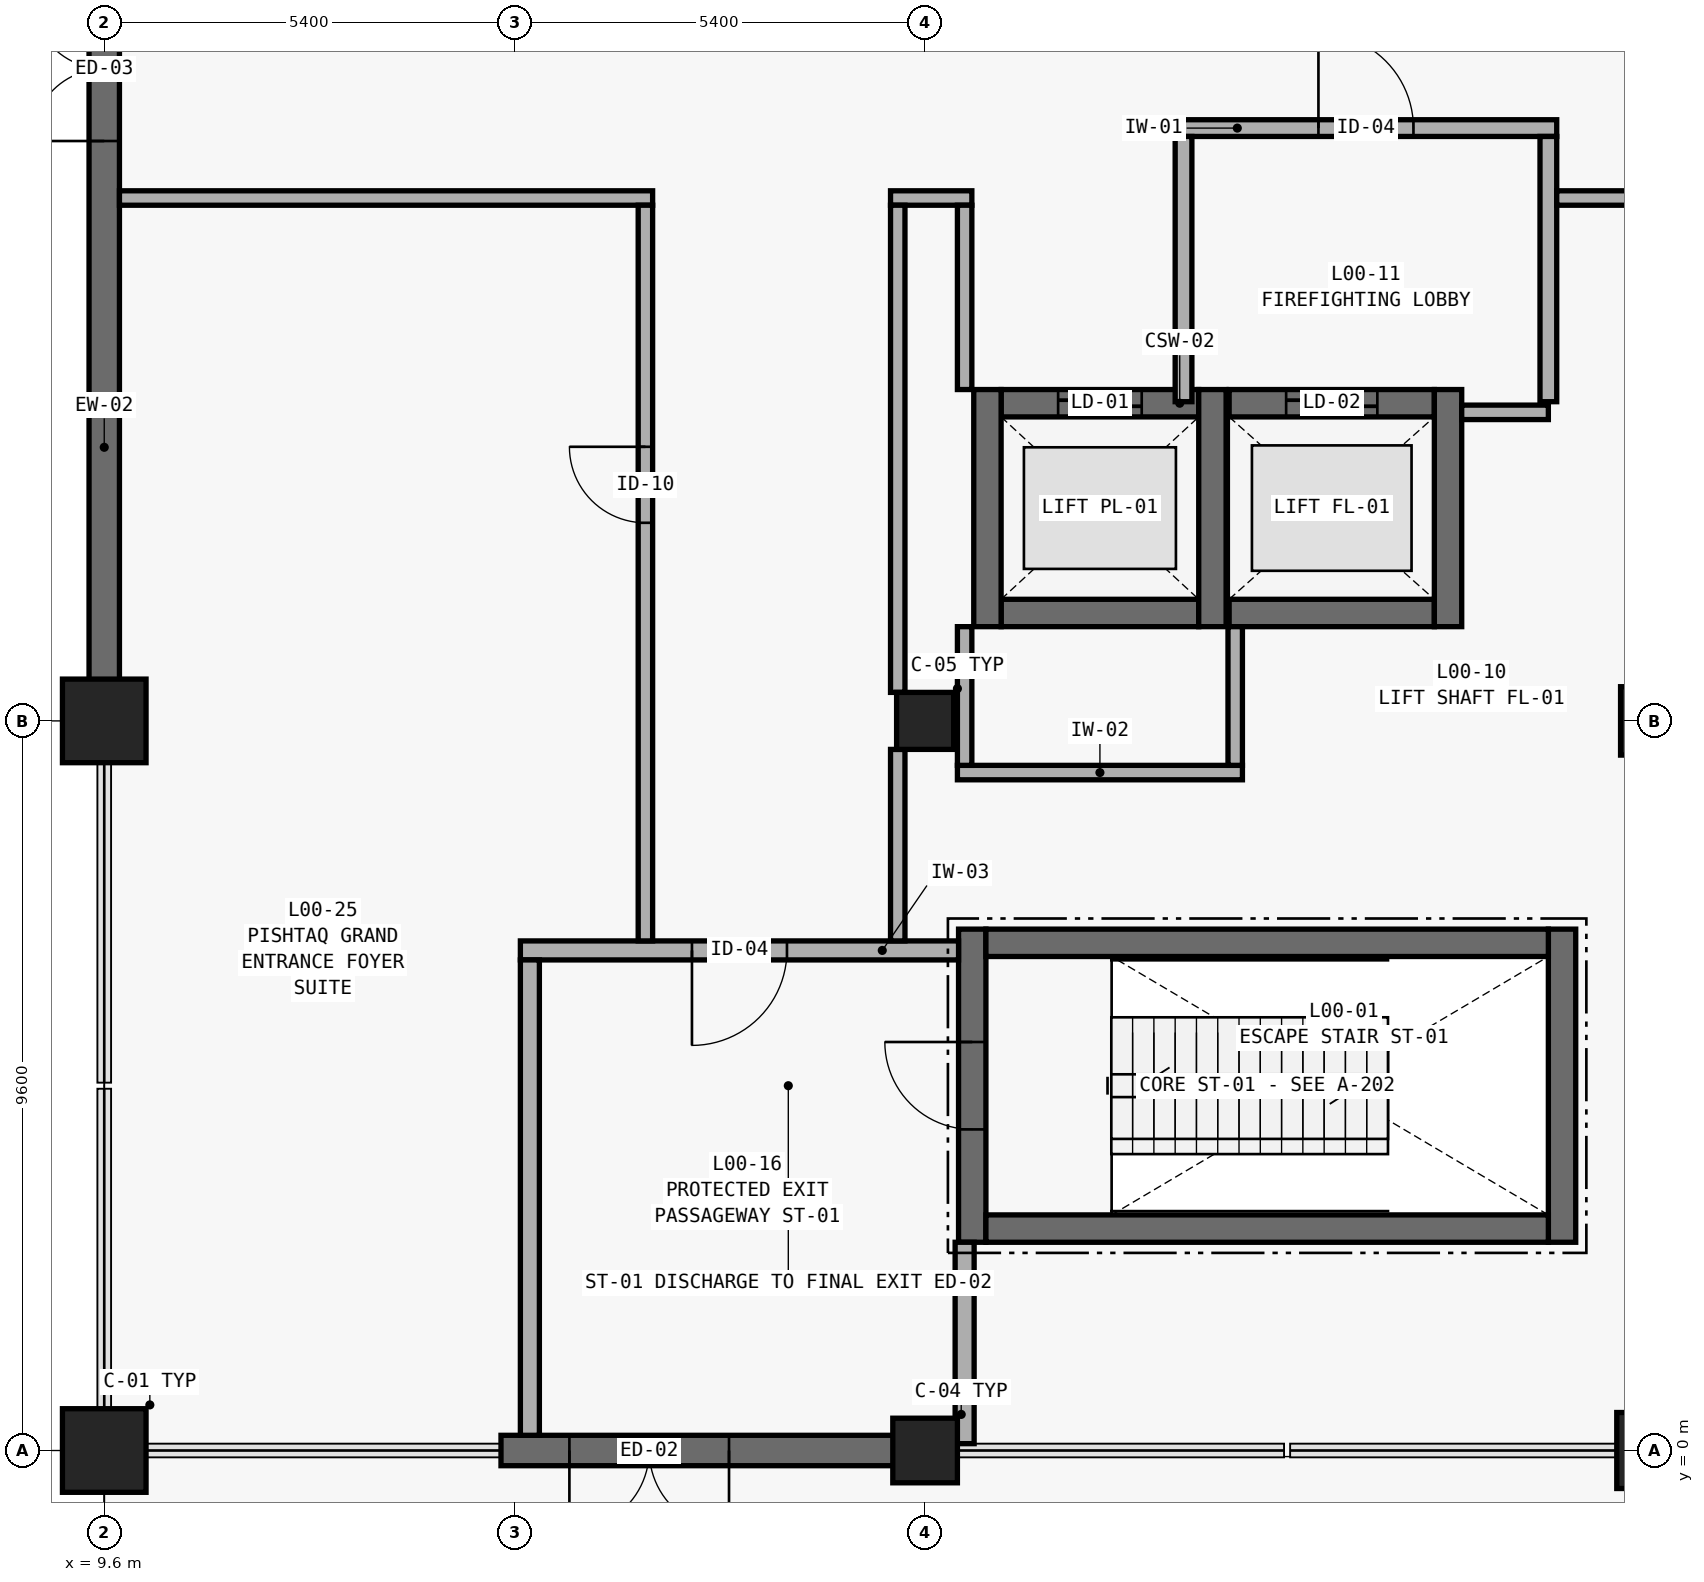
"""IFC4 building model, lengths in metres.
Left out: names, types, materials, properties, quantities, classifications, styles, units other than length and angle.
Written with IfcOpenShell. Run it as: python <this file> out.ifc"""

import sys

from ifc_helpers import new_model, si_unit, direction, frame, frame_2d, origin, origin_2d, place, context, subcontext, project, spatial, rectangle, extrude, element, fill, save


model = new_model("IFC4")
c1 = context("Model", 3, precision=1e-05, world=origin(), true_north=direction((0.0, 1.0)))
c2 = subcontext(c1, "Body", "Model", "MODEL_VIEW")
j1 = project(units=[si_unit("LENGTHUNIT", "METRE"), si_unit("PLANEANGLEUNIT", "RADIAN")], contexts=[c1])
p1 = place(None, origin())
s1 = spatial("IfcSite", under=j1, at=p1, CompositionType="ELEMENT")
p2 = place(p1, origin())
s2 = spatial("IfcBuilding", under=s1, at=p2, CompositionType="ELEMENT")
p3 = place(p2, origin())
s3 = spatial("IfcBuildingStorey", under=s2, at=p3, CompositionType="ELEMENT", Elevation=0.0)
for number, where, z_axis, x_axis in (
    (1, (9.6, 0.0, 0.0), (0.0, 0.0, 1.0), (1.0, 0.0, 0.0)),
    (2, (9.6, 9.6, 0.0), (0.0, 0.0, 1.0), (1.0, 0.0, 0.0)),
):
    element("IfcColumn", number, at=place(p3, frame(where, z_axis=z_axis, x_axis=x_axis)), inside=s3, PredefinedType="COLUMN", context=c2, shape_type="SweptSolid", body=[
        extrude(rectangle(XDim=1.1, YDim=1.1, at=origin_2d()), origin(), (0.0, 0.0, 1.0), 4.8),
    ])
p4 = place(p3, frame((20.4, 0.0, 0.0), z_axis=(0.0, 0.0, 1.0), x_axis=(1.0, 0.0, 0.0)))
e3 = element("IfcColumn", 3, at=p4, inside=s3, PredefinedType="COLUMN", context=c2, shape_type="SweptSolid", body=[
    extrude(rectangle(XDim=0.85, YDim=0.85, at=origin_2d()), origin(), (0.0, 0.0, 1.0), 4.8),
])
p5 = place(p3, frame((20.4, 9.6, 0.0), z_axis=(0.0, 0.0, 1.0), x_axis=(1.0, 0.0, 0.0)))
e4 = element("IfcColumn", 4, at=p5, inside=s3, PredefinedType="COLUMN", context=c2, shape_type="SweptSolid", body=[
    extrude(rectangle(XDim=0.75, YDim=0.75, at=origin_2d()), origin(), (0.0, 0.0, 1.0), 4.8),
])
p6 = place(p3, frame((30.0, 0.0, 0.0), z_axis=(0.0, 0.0, 1.0), x_axis=(1.0, 0.0, 0.0)))
e5 = element("IfcColumn", 5, at=p6, inside=s3, PredefinedType="COLUMN", context=c2, shape_type="SweptSolid", body=[
    extrude(rectangle(XDim=1.0, YDim=1.0, at=origin_2d()), origin(), (0.0, 0.0, 1.0), 4.8),
])
p7 = place(p3, frame((30.0, 9.6, 0.0), z_axis=(0.0, 0.0, 1.0), x_axis=(1.0, 0.0, 0.0)))
e6 = element("IfcColumn", 6, at=p7, inside=s3, PredefinedType="COLUMN", context=c2, shape_type="SweptSolid", body=[
    extrude(rectangle(XDim=0.9, YDim=0.9, at=origin_2d()), origin(), (0.0, 0.0, 1.0), 4.8),
])
p8 = place(p3, frame((9.6, 21.78, 0.0), z_axis=(0.0, 0.0, 1.0), x_axis=(0.0, -1.0, 0.0)))
e7 = element("IfcWall", 7, at=p8, inside=s3, PredefinedType="STANDARD", context=c2, shape_type="SweptSolid", body=[
    extrude(rectangle(XDim=12.36, YDim=0.4, at=frame_2d((6.18, 0.0))), origin(), (0.0, 0.0, 1.0), 4.5),
])
p9 = place(p8, frame((2.65, 0.0, 0.0)))
e8 = element("IfcOpeningElement", 8, at=p9, cuts=e7, PredefinedType="OPENING", context=c2, shape_type="SweptSolid", body=[
    extrude(rectangle(XDim=1.9, YDim=2.4, at=frame_2d((0.95, 1.2))), frame((0.0, 0.215, 0.0), z_axis=(0.0, -1.0, 0.0), x_axis=(1.0, 0.0, 0.0)), (0.0, 0.0, 1.0), 0.43),
])
p10 = place(p3, frame((14.82, 0.0, 0.0), z_axis=(0.0, 0.0, 1.0), x_axis=(1.0, 0.0, 0.0)))
e9 = element("IfcWall", 9, at=p10, inside=s3, PredefinedType="STANDARD", context=c2, shape_type="SweptSolid", body=[
    extrude(rectangle(XDim=5.76, YDim=0.4, at=frame_2d((2.88, 0.0))), origin(), (0.0, 0.0, 1.0), 4.5),
])
p11 = place(p10, frame((0.9, 0.0, 0.0)))
e10 = element("IfcOpeningElement", 10, at=p11, cuts=e9, PredefinedType="OPENING", context=c2, shape_type="SweptSolid", body=[
    extrude(rectangle(XDim=2.1, YDim=2.6, at=frame_2d((1.05, 1.3))), frame((0.0, 0.215, 0.0), z_axis=(0.0, -1.0, 0.0), x_axis=(1.0, 0.0, 0.0)), (0.0, 0.0, 1.0), 0.43),
])
p12 = place(p3, frame((21.02, 2.74, 0.0), z_axis=(0.0, 0.0, 1.0), x_axis=(0.0, 1.0, 0.0)))
e11 = element("IfcWall", 11, at=p12, inside=s3, PredefinedType="SHEAR", context=c2, shape_type="SweptSolid", body=[
    extrude(rectangle(XDim=4.12, YDim=0.36, at=frame_2d((2.06, 0.0))), origin(), (0.0, 0.0, 1.0), 4.5),
])
p13 = place(p12, frame((1.485, 0.0, 0.0)))
e12 = element("IfcOpeningElement", 12, at=p13, cuts=e11, PredefinedType="OPENING", context=c2, shape_type="SweptSolid", body=[
    extrude(rectangle(XDim=1.15, YDim=2.15, at=frame_2d((0.575, 1.075))), frame((0.0, 0.195, 0.0), z_axis=(0.0, -1.0, 0.0), x_axis=(1.0, 0.0, 0.0)), (0.0, 0.0, 1.0), 0.39),
])
p14 = place(p3, frame((28.78, 2.74, 0.0), z_axis=(0.0, 0.0, 1.0), x_axis=(0.0, 1.0, 0.0)))
e13 = element("IfcWall", 13, at=p14, inside=s3, PredefinedType="SHEAR", context=c2, shape_type="SweptSolid", body=[
    extrude(rectangle(XDim=4.12, YDim=0.36, at=frame_2d((2.06, 0.0))), origin(), (0.0, 0.0, 1.0), 4.5),
])
for number, where, z_axis, x_axis in (
    (14, (21.2, 6.68, 0.0), (0.0, 0.0, 1.0), (1.0, 0.0, 0.0)),
    (15, (21.2, 2.92, 0.0), (0.0, 0.0, 1.0), (1.0, 0.0, 0.0)),
):
    element("IfcWall", number, at=place(p3, frame(where, z_axis=z_axis, x_axis=x_axis)), inside=s3, PredefinedType="SHEAR", context=c2, shape_type="SweptSolid", body=[
        extrude(rectangle(XDim=7.4, YDim=0.36, at=frame_2d((3.7, 0.0))), origin(), (0.0, 0.0, 1.0), 4.5),
    ])
p15 = place(p3, frame((21.4, 13.78, 0.0), z_axis=(0.0, 0.0, 1.0), x_axis=(1.0, 0.0, 0.0)))
e16 = element("IfcWall", 16, at=p15, inside=s3, PredefinedType="SHEAR", context=c2, shape_type="SweptSolid", body=[
    extrude(rectangle(XDim=2.6, YDim=0.36, at=frame_2d((1.3, 0.0))), origin(), (0.0, 0.0, 1.0), 4.5),
])
p16 = place(p15, frame((0.75, 0.0, 0.0)))
e17 = element("IfcOpeningElement", 17, at=p16, cuts=e16, PredefinedType="OPENING", context=c2, shape_type="SweptSolid", body=[
    extrude(rectangle(XDim=1.1, YDim=2.15, at=frame_2d((0.55, 1.075))), frame((0.0, 0.195, 0.0), z_axis=(0.0, -1.0, 0.0), x_axis=(1.0, 0.0, 0.0)), (0.0, 0.0, 1.0), 0.39),
])
p17 = place(p3, frame((21.4, 11.02, 0.0), z_axis=(0.0, 0.0, 1.0), x_axis=(1.0, 0.0, 0.0)))
e18 = element("IfcWall", 18, at=p17, inside=s3, PredefinedType="SHEAR", context=c2, shape_type="SweptSolid", body=[
    extrude(rectangle(XDim=2.6, YDim=0.36, at=frame_2d((1.3, 0.0))), origin(), (0.0, 0.0, 1.0), 4.5),
])
for number, where, z_axis, x_axis in (
    (19, (21.22, 10.84, 0.0), (0.0, 0.0, 1.0), (0.0, 1.0, 0.0)),
    (20, (24.18, 10.84, 0.0), (0.0, 0.0, 1.0), (0.0, 1.0, 0.0)),
):
    element("IfcWall", number, at=place(p3, frame(where, z_axis=z_axis, x_axis=x_axis)), inside=s3, PredefinedType="SHEAR", context=c2, shape_type="SweptSolid", body=[
        extrude(rectangle(XDim=3.12, YDim=0.36, at=frame_2d((1.56, 0.0))), origin(), (0.0, 0.0, 1.0), 4.5),
    ])
p18 = place(p3, frame((24.4, 13.78, 0.0), z_axis=(0.0, 0.0, 1.0), x_axis=(1.0, 0.0, 0.0)))
e21 = element("IfcWall", 21, at=p18, inside=s3, PredefinedType="SHEAR", context=c2, shape_type="SweptSolid", body=[
    extrude(rectangle(XDim=2.7, YDim=0.36, at=frame_2d((1.35, 0.0))), origin(), (0.0, 0.0, 1.0), 4.5),
])
p19 = place(p18, frame((0.75, 0.0, 0.0)))
e22 = element("IfcOpeningElement", 22, at=p19, cuts=e21, PredefinedType="OPENING", context=c2, shape_type="SweptSolid", body=[
    extrude(rectangle(XDim=1.2, YDim=2.15, at=frame_2d((0.6, 1.075))), frame((0.0, 0.195, 0.0), z_axis=(0.0, -1.0, 0.0), x_axis=(1.0, 0.0, 0.0)), (0.0, 0.0, 1.0), 0.39),
])
p20 = place(p3, frame((24.4, 11.02, 0.0), z_axis=(0.0, 0.0, 1.0), x_axis=(1.0, 0.0, 0.0)))
e23 = element("IfcWall", 23, at=p20, inside=s3, PredefinedType="SHEAR", context=c2, shape_type="SweptSolid", body=[
    extrude(rectangle(XDim=2.7, YDim=0.36, at=frame_2d((1.35, 0.0))), origin(), (0.0, 0.0, 1.0), 4.5),
])
p21 = place(p3, frame((27.28, 10.84, 0.0), z_axis=(0.0, 0.0, 1.0), x_axis=(0.0, 1.0, 0.0)))
e24 = element("IfcWall", 24, at=p21, inside=s3, PredefinedType="SHEAR", context=c2, shape_type="SweptSolid", body=[
    extrude(rectangle(XDim=3.12, YDim=0.36, at=frame_2d((1.56, 0.0))), origin(), (0.0, 0.0, 1.0), 4.5),
])
p22 = place(p3, frame((23.69, 17.4, 0.0), z_axis=(0.0, 0.0, 1.0), x_axis=(1.0, 0.0, 0.0)))
e25 = element("IfcWall", 25, at=p22, inside=s3, PredefinedType="PARTITIONING", context=c2, shape_type="SweptSolid", body=[
    extrude(rectangle(XDim=5.02, YDim=0.22, at=frame_2d((2.51, 0.0))), origin(), (0.0, 0.0, 1.0), 3.38),
])
p23 = place(p22, frame((1.885, 0.0, 0.0)))
e26 = element("IfcOpeningElement", 26, at=p23, cuts=e25, PredefinedType="OPENING", context=c2, shape_type="SweptSolid", body=[
    extrude(rectangle(XDim=1.25, YDim=2.15, at=frame_2d((0.625, 1.075))), frame((0.0, 0.125, 0.0), z_axis=(0.0, -1.0, 0.0), x_axis=(1.0, 0.0, 0.0)), (0.0, 0.0, 1.0), 0.25),
])
for number, where, z_axis, x_axis in (
    (27, (23.8, 13.8, 0.0), (0.0, 0.0, 1.0), (0.0, 1.0, 0.0)),
    (28, (28.6, 13.8, 0.0), (0.0, 0.0, 1.0), (0.0, 1.0, 0.0)),
):
    element("IfcWall", number, at=place(p3, frame(where, z_axis=z_axis, x_axis=x_axis)), inside=s3, PredefinedType="PARTITIONING", context=c2, shape_type="SweptSolid", body=[
        extrude(rectangle(XDim=3.49, YDim=0.22, at=frame_2d((1.745, 0.0))), origin(), (0.0, 0.0, 1.0), 3.38),
    ])
p24 = place(p3, frame((15.075, 6.58, 0.0), z_axis=(0.0, 0.0, 1.0), x_axis=(1.0, 0.0, 0.0)))
e29 = element("IfcWall", 29, at=p24, inside=s3, PredefinedType="PARTITIONING", context=c2, shape_type="SweptSolid", body=[
    extrude(rectangle(XDim=5.765, YDim=0.25, at=frame_2d((2.883, 0.0))), origin(), (0.0, 0.0, 1.0), 3.38),
])
p25 = place(p24, frame((2.258, 0.0, 0.0)))
e30 = element("IfcOpeningElement", 30, at=p25, cuts=e29, PredefinedType="OPENING", context=c2, shape_type="SweptSolid", body=[
    extrude(rectangle(XDim=1.25, YDim=2.15, at=frame_2d((0.625, 1.075))), frame((0.0, 0.14, 0.0), z_axis=(0.0, -1.0, 0.0), x_axis=(1.0, 0.0, 0.0)), (0.0, 0.0, 1.0), 0.28),
])
p26 = place(p3, frame((20.825, 8.92, 0.0), z_axis=(0.0, 0.0, 1.0), x_axis=(1.0, 0.0, 0.0)))
e31 = element("IfcWall", 31, at=p26, inside=s3, PredefinedType="PARTITIONING", context=c2, shape_type="SweptSolid", body=[
    extrude(rectangle(XDim=3.75, YDim=0.19, at=frame_2d((1.875, 0.0))), origin(), (0.0, 0.0, 1.0), 3.38),
])
p27 = place(p3, frame((27.46, 13.66, 0.0), z_axis=(0.0, 0.0, 1.0), x_axis=(1.0, 0.0, 0.0)))
e32 = element("IfcWall", 32, at=p27, inside=s3, PredefinedType="PARTITIONING", context=c2, shape_type="SweptSolid", body=[
    extrude(rectangle(XDim=1.14, YDim=0.19, at=frame_2d((0.57, 0.0))), origin(), (0.0, 0.0, 1.0), 3.38),
])
p28 = place(p3, frame((9.8, 16.48, 0.0), z_axis=(0.0, 0.0, 1.0), x_axis=(1.0, 0.0, 0.0)))
e33 = element("IfcWall", 33, at=p28, inside=s3, PredefinedType="PARTITIONING", context=c2, shape_type="SweptSolid", body=[
    extrude(rectangle(XDim=7.015, YDim=0.19, at=frame_2d((3.507, 0.0))), origin(), (0.0, 0.0, 1.0), 3.38),
])
p29 = place(p3, frame((19.945, 16.48, 0.0), z_axis=(0.0, 0.0, 1.0), x_axis=(1.0, 0.0, 0.0)))
e34 = element("IfcWall", 34, at=p29, inside=s3, PredefinedType="PARTITIONING", context=c2, shape_type="SweptSolid", body=[
    extrude(rectangle(XDim=1.07, YDim=0.19, at=frame_2d((0.535, 0.0))), origin(), (0.0, 0.0, 1.0), 3.38),
])
p30 = place(p3, frame((28.71, 16.48, 0.0), z_axis=(0.0, 0.0, 1.0), x_axis=(1.0, 0.0, 0.0)))
e35 = element("IfcWall", 35, at=p30, inside=s3, PredefinedType="PARTITIONING", context=c2, shape_type="SweptSolid", body=[
    extrude(rectangle(XDim=2.305, YDim=0.19, at=frame_2d((1.152, 0.0))), origin(), (0.0, 0.0, 1.0), 3.38),
])
p31 = place(p3, frame((15.2, 0.2, 0.0), z_axis=(0.0, 0.0, 1.0), x_axis=(0.0, 1.0, 0.0)))
e36 = element("IfcWall", 36, at=p31, inside=s3, PredefinedType="PARTITIONING", context=c2, shape_type="SweptSolid", body=[
    extrude(rectangle(XDim=6.255, YDim=0.25, at=frame_2d((3.127, 0.0))), origin(), (0.0, 0.0, 1.0), 3.38),
])
p32 = place(p3, frame((16.72, 6.705, 0.0), z_axis=(0.0, 0.0, 1.0), x_axis=(0.0, 1.0, 0.0)))
e37 = element("IfcWall", 37, at=p32, inside=s3, PredefinedType="PARTITIONING", context=c2, shape_type="SweptSolid", body=[
    extrude(rectangle(XDim=9.68, YDim=0.19, at=frame_2d((4.84, 0.0))), origin(), (0.0, 0.0, 1.0), 3.38),
])
p33 = place(p32, frame((5.502, 0.0, 0.0)))
e38 = element("IfcOpeningElement", 38, at=p33, cuts=e37, PredefinedType="OPENING", context=c2, shape_type="SweptSolid", body=[
    extrude(rectangle(XDim=1.0, YDim=2.15, at=frame_2d((0.5, 1.075))), frame((0.0, 0.11, 0.0), z_axis=(0.0, -1.0, 0.0), x_axis=(1.0, 0.0, 0.0)), (0.0, 0.0, 1.0), 0.22),
])
p34 = place(p3, frame((20.04, 6.705, 0.0), z_axis=(0.0, 0.0, 1.0), x_axis=(0.0, 1.0, 0.0)))
e39 = element("IfcWall", 39, at=p34, inside=s3, PredefinedType="PARTITIONING", context=c2, shape_type="SweptSolid", body=[
    extrude(rectangle(XDim=2.52, YDim=0.19, at=frame_2d((1.26, 0.0))), origin(), (0.0, 0.0, 1.0), 3.38),
])
p35 = place(p3, frame((20.04, 9.975, 0.0), z_axis=(0.0, 0.0, 1.0), x_axis=(0.0, 1.0, 0.0)))
e40 = element("IfcWall", 40, at=p35, inside=s3, PredefinedType="PARTITIONING", context=c2, shape_type="SweptSolid", body=[
    extrude(rectangle(XDim=6.41, YDim=0.19, at=frame_2d((3.205, 0.0))), origin(), (0.0, 0.0, 1.0), 3.38),
])
p36 = place(p3, frame((20.92, 0.09, 0.0), z_axis=(0.0, 0.0, 1.0), x_axis=(0.0, 1.0, 0.0)))
e41 = element("IfcWall", 41, at=p36, inside=s3, PredefinedType="PARTITIONING", context=c2, shape_type="SweptSolid", body=[
    extrude(rectangle(XDim=2.65, YDim=0.25, at=frame_2d((1.325, 0.0))), origin(), (0.0, 0.0, 1.0), 3.38),
])
p37 = place(p3, frame((20.92, 9.015, 0.0), z_axis=(0.0, 0.0, 1.0), x_axis=(0.0, 1.0, 0.0)))
e42 = element("IfcWall", 42, at=p37, inside=s3, PredefinedType="PARTITIONING", context=c2, shape_type="SweptSolid", body=[
    extrude(rectangle(XDim=1.825, YDim=0.19, at=frame_2d((0.913, 0.0))), origin(), (0.0, 0.0, 1.0), 3.38),
])
p38 = place(p3, frame((20.92, 13.96, 0.0), z_axis=(0.0, 0.0, 1.0), x_axis=(0.0, 1.0, 0.0)))
e43 = element("IfcWall", 43, at=p38, inside=s3, PredefinedType="PARTITIONING", context=c2, shape_type="SweptSolid", body=[
    extrude(rectangle(XDim=2.425, YDim=0.19, at=frame_2d((1.212, 0.0))), origin(), (0.0, 0.0, 1.0), 3.38),
])
p39 = place(p3, frame((24.48, 9.015, 0.0), z_axis=(0.0, 0.0, 1.0), x_axis=(0.0, 1.0, 0.0)))
e44 = element("IfcWall", 44, at=p39, inside=s3, PredefinedType="PARTITIONING", context=c2, shape_type="SweptSolid", body=[
    extrude(rectangle(XDim=1.825, YDim=0.19, at=frame_2d((0.913, 0.0))), origin(), (0.0, 0.0, 1.0), 3.38),
])
p40 = place(p9, frame((1.9, 0.0, 0.0), z_axis=(0.0, 0.0, 1.0), x_axis=(-1.0, 0.0, 0.0)))
e45 = element("IfcDoor", 45, at=p40, inside=s3, OperationType="DOUBLE_DOOR_SINGLE_SWING", PredefinedType="DOOR", context=c2, shape_type="SweptSolid", body=[
    extrude(rectangle(XDim=1.9, YDim=2.4, at=frame_2d((0.95, 1.2))), frame((0.0, 0.025, 0.0), z_axis=(0.0, -1.0, 0.0), x_axis=(1.0, 0.0, 0.0)), (0.0, 0.0, 1.0), 0.05),
])
fill(e8, e45)
p41 = place(p11, frame((2.1, 0.0, 0.0), z_axis=(0.0, 0.0, 1.0), x_axis=(-1.0, 0.0, 0.0)))
e46 = element("IfcDoor", 46, at=p41, inside=s3, OperationType="DOUBLE_DOOR_SINGLE_SWING", PredefinedType="DOOR", context=c2, shape_type="SweptSolid", body=[
    extrude(rectangle(XDim=2.1, YDim=2.6, at=frame_2d((1.05, 1.3))), frame((0.0, 0.025, 0.0), z_axis=(0.0, -1.0, 0.0), x_axis=(1.0, 0.0, 0.0)), (0.0, 0.0, 1.0), 0.05),
])
fill(e10, e46)
p42 = place(p13, origin())
e47 = element("IfcDoor", 47, at=p42, inside=s3, OperationType="SINGLE_SWING_RIGHT", PredefinedType="DOOR", context=c2, shape_type="SweptSolid", body=[
    extrude(rectangle(XDim=1.15, YDim=2.15, at=frame_2d((0.575, 1.075))), frame((0.0, 0.025, 0.0), z_axis=(0.0, -1.0, 0.0), x_axis=(1.0, 0.0, 0.0)), (0.0, 0.0, 1.0), 0.05),
])
fill(e12, e47)
p43 = place(p16, origin())
e48 = element("IfcDoor", 48, at=p43, inside=s3, OperationType="DOUBLE_DOOR_SLIDING", PredefinedType="DOOR", context=c2, shape_type="SweptSolid", body=[
    extrude(rectangle(XDim=1.1, YDim=2.15, at=frame_2d((0.55, 1.075))), frame((0.0, 0.025, 0.0), z_axis=(0.0, -1.0, 0.0), x_axis=(1.0, 0.0, 0.0)), (0.0, 0.0, 1.0), 0.05),
])
fill(e17, e48)
p44 = place(p19, origin())
e49 = element("IfcDoor", 49, at=p44, inside=s3, OperationType="DOUBLE_DOOR_SLIDING", PredefinedType="DOOR", context=c2, shape_type="SweptSolid", body=[
    extrude(rectangle(XDim=1.2, YDim=2.15, at=frame_2d((0.6, 1.075))), frame((0.0, 0.025, 0.0), z_axis=(0.0, -1.0, 0.0), x_axis=(1.0, 0.0, 0.0)), (0.0, 0.0, 1.0), 0.05),
])
fill(e22, e49)
p45 = place(p23, origin())
e50 = element("IfcDoor", 50, at=p45, inside=s3, OperationType="SINGLE_SWING_LEFT", PredefinedType="DOOR", context=c2, shape_type="SweptSolid", body=[
    extrude(rectangle(XDim=1.25, YDim=2.15, at=frame_2d((0.625, 1.075))), frame((0.0, 0.025, 0.0), z_axis=(0.0, -1.0, 0.0), x_axis=(1.0, 0.0, 0.0)), (0.0, 0.0, 1.0), 0.05),
])
fill(e26, e50)
p46 = place(p25, frame((1.25, 0.0, 0.0), z_axis=(0.0, 0.0, 1.0), x_axis=(-1.0, 0.0, 0.0)))
e51 = element("IfcDoor", 51, at=p46, inside=s3, OperationType="SINGLE_SWING_LEFT", PredefinedType="DOOR", context=c2, shape_type="SweptSolid", body=[
    extrude(rectangle(XDim=1.25, YDim=2.15, at=frame_2d((0.625, 1.075))), frame((0.0, 0.025, 0.0), z_axis=(0.0, -1.0, 0.0), x_axis=(1.0, 0.0, 0.0)), (0.0, 0.0, 1.0), 0.05),
])
fill(e30, e51)
p47 = place(p33, origin())
e52 = element("IfcDoor", 52, at=p47, inside=s3, OperationType="SINGLE_SWING_RIGHT", PredefinedType="DOOR", context=c2, shape_type="SweptSolid", body=[
    extrude(rectangle(XDim=1.0, YDim=2.15, at=frame_2d((0.5, 1.075))), frame((0.0, 0.025, 0.0), z_axis=(0.0, -1.0, 0.0), x_axis=(1.0, 0.0, 0.0)), (0.0, 0.0, 1.0), 0.05),
])
fill(e38, e52)
save(model, sys.argv[1])
